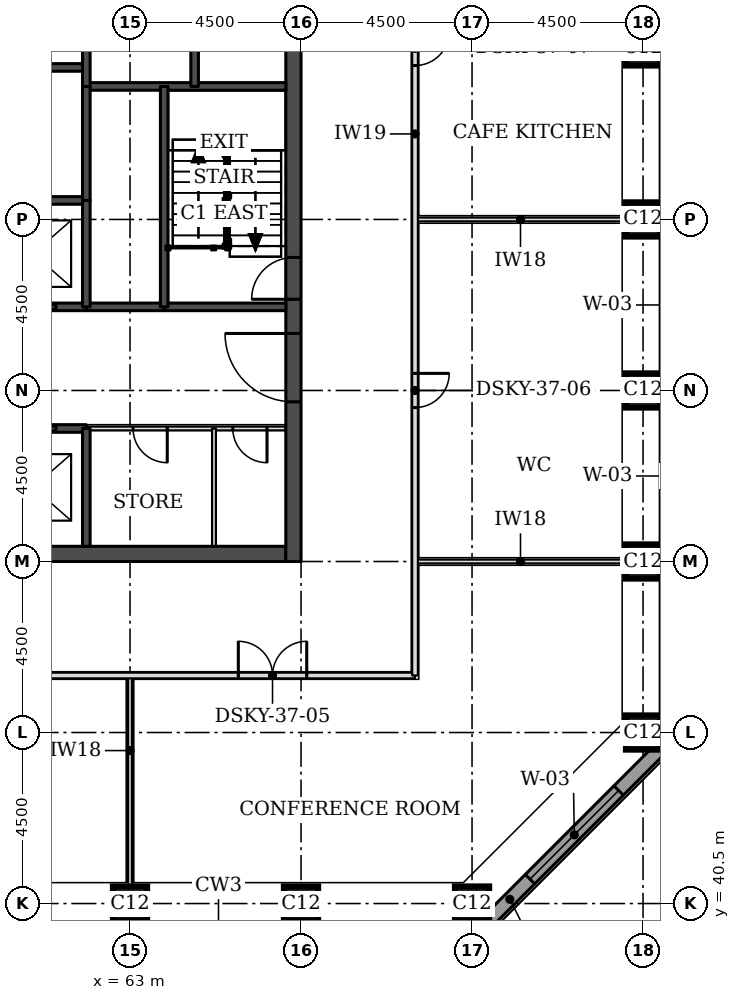
"""IFC4 building model, lengths in metres.
Left out: names, types, materials, properties, quantities, classifications, styles, units other than length and angle.
Written with IfcOpenShell. Run it as: python <this file> out.ifc"""

import sys

from ifc_helpers import new_model, si_unit, direction, frame, frame_2d, origin, origin_2d, place, context, subcontext, project, spatial, rectangle, extrude, element, fill, save


model = new_model("IFC4")
c1 = context("Model", 3, precision=1e-05, world=origin(), true_north=direction((0.0, 1.0)))
c2 = subcontext(c1, "Body", "Model", "MODEL_VIEW")
j1 = project(units=[si_unit("LENGTHUNIT", "METRE"), si_unit("PLANEANGLEUNIT", "RADIAN")], contexts=[c1])
p1 = place(None, origin())
s1 = spatial("IfcSite", under=j1, at=p1, CompositionType="ELEMENT")
p2 = place(p1, origin())
s2 = spatial("IfcBuilding", under=s1, at=p2, CompositionType="ELEMENT")
p3 = place(p2, frame((0.0, 0.0, 143.1)))
s3 = spatial("IfcBuildingStorey", under=s2, at=p3, CompositionType="ELEMENT", Elevation=143.1)
for number, where, z_axis, x_axis in (
    (1, (63.0, 40.5, 0.0), (0.0, 0.0, 1.0), (1.0, 0.0, 0.0)),
    (2, (67.5, 40.5, 0.0), (0.0, 0.0, 1.0), (1.0, 0.0, 0.0)),
    (3, (72.0, 40.5, 0.0), (0.0, 0.0, 1.0), (1.0, 0.0, 0.0)),
    (4, (76.5, 45.0, 0.0), (0.0, 0.0, 1.0), (1.0, 0.0, 0.0)),
    (5, (76.5, 49.5, 0.0), (0.0, 0.0, 1.0), (1.0, 0.0, 0.0)),
    (6, (76.5, 54.0, 0.0), (0.0, 0.0, 1.0), (1.0, 0.0, 0.0)),
    (7, (76.5, 58.5, 0.0), (0.0, 0.0, 1.0), (1.0, 0.0, 0.0)),
    (8, (76.5, 63.0, 0.0), (0.0, 0.0, 1.0), (1.0, 0.0, 0.0)),
):
    element("IfcColumn", number, at=place(p3, frame(where, z_axis=z_axis, x_axis=x_axis)), inside=s3, PredefinedType="COLUMN", context=c2, shape_type="SweptSolid", body=[
        extrude(rectangle(XDim=0.9, YDim=0.9, at=origin_2d()), origin(), (0.0, 0.0, 1.0), 4.6),
    ])
p4 = place(p3, frame((45.4, 49.7, 0.0), z_axis=(0.0, 0.0, 1.0), x_axis=(1.0, 0.0, 0.0)))
e9 = element("IfcWall", 9, at=p4, inside=s3, PredefinedType="SHEAR", context=c2, shape_type="SweptSolid", body=[
    extrude(rectangle(XDim=21.7, YDim=0.4, at=frame_2d((10.85, 0.0))), origin(), (0.0, 0.0, 1.0), 4.6),
])
p5 = place(p3, frame((67.3, 49.5, 0.0), z_axis=(0.0, 0.0, 1.0), x_axis=(0.0, 1.0, 0.0)))
e10 = element("IfcWall", 10, at=p5, inside=s3, PredefinedType="SHEAR", context=c2, shape_type="SweptSolid", body=[
    extrude(rectangle(XDim=22.5, YDim=0.4, at=frame_2d((11.25, 0.0))), origin(), (0.0, 0.0, 1.0), 4.6),
])
p6 = place(p5, frame((4.2, 0.0, 0.0)))
e11 = element("IfcOpeningElement", 11, at=p6, cuts=e10, PredefinedType="OPENING", context=c2, shape_type="SweptSolid", body=[
    extrude(rectangle(XDim=1.8, YDim=2.1, at=frame_2d((0.9, 1.05))), frame((0.0, 0.21, 0.0), z_axis=(0.0, -1.0, 0.0), x_axis=(1.0, 0.0, 0.0)), (0.0, 0.0, 1.0), 0.42),
])
p7 = place(p5, frame((6.9, 0.0, 0.0)))
e12 = element("IfcOpeningElement", 12, at=p7, cuts=e10, PredefinedType="OPENING", context=c2, shape_type="SweptSolid", body=[
    extrude(rectangle(XDim=1.1, YDim=2.1, at=frame_2d((0.55, 1.05))), frame((0.0, 0.21, 0.0), z_axis=(0.0, -1.0, 0.0), x_axis=(1.0, 0.0, 0.0)), (0.0, 0.0, 1.0), 0.42),
])
p8 = place(p5, frame((13.6, 0.0, 0.0)))
e13 = element("IfcOpeningElement", 13, at=p8, cuts=e10, PredefinedType="OPENING", context=c2, shape_type="SweptSolid", body=[
    extrude(rectangle(XDim=1.1, YDim=2.1, at=frame_2d((0.55, 1.05))), frame((0.0, 0.21, 0.0), z_axis=(0.0, -1.0, 0.0), x_axis=(1.0, 0.0, 0.0)), (0.0, 0.0, 1.0), 0.42),
])
p9 = place(p5, frame((16.5, 0.0, 0.0)))
e14 = element("IfcOpeningElement", 14, at=p9, cuts=e10, PredefinedType="OPENING", context=c2, shape_type="SweptSolid", body=[
    extrude(rectangle(XDim=1.8, YDim=2.1, at=frame_2d((0.9, 1.05))), frame((0.0, 0.21, 0.0), z_axis=(0.0, -1.0, 0.0), x_axis=(1.0, 0.0, 0.0)), (0.0, 0.0, 1.0), 0.42),
])
p10 = place(p3, frame((72.208, 39.824, 0.0), z_axis=(0.0, 0.0, 1.0), x_axis=(0.707106781187, 0.707106781187, 0.0)))
e15 = element("IfcWall", 15, at=p10, inside=s3, PredefinedType="STANDARD", context=c2, shape_type="SweptSolid", body=[
    extrude(rectangle(XDim=7.027, YDim=0.35, at=frame_2d((3.513, 0.0))), origin(), (0.0, 0.0, 1.0), 4.425),
])
p11 = place(p10, frame((1.863, 0.0, 0.9)))
e16 = element("IfcOpeningElement", 16, at=p11, cuts=e15, PredefinedType="OPENING", context=c2, shape_type="SweptSolid", body=[
    extrude(rectangle(XDim=3.3, YDim=2.7, at=frame_2d((1.65, 1.35))), frame((0.0, 0.185, 0.0), z_axis=(0.0, -1.0, 0.0), x_axis=(1.0, 0.0, 0.0)), (0.0, 0.0, 1.0), 0.37),
])
for number, where, z_axis, x_axis in (
    (17, (63.0, 40.95, 0.0), (0.0, 0.0, 1.0), (0.0, 1.0, 0.0)),
    (18, (70.5, 49.5, 0.0), (0.0, 0.0, 1.0), (1.0, 0.0, 0.0)),
    (19, (70.5, 58.5, 0.0), (0.0, 0.0, 1.0), (1.0, 0.0, 0.0)),
):
    element("IfcWall", number, at=place(p3, frame(where, z_axis=z_axis, x_axis=x_axis)), inside=s3, PredefinedType="PARTITIONING", context=c2, shape_type="SweptSolid", body=[
        extrude(rectangle(XDim=5.55, YDim=0.1, at=frame_2d((2.775, 0.0))), origin(), (0.0, 0.0, 1.0), 4.45),
    ])
p12 = place(p3, frame((42.0, 46.5, 0.0), z_axis=(0.0, 0.0, 1.0), x_axis=(1.0, 0.0, 0.0)))
e20 = element("IfcWall", 20, at=p12, inside=s3, PredefinedType="PARTITIONING", context=c2, shape_type="SweptSolid", body=[
    extrude(rectangle(XDim=28.5, YDim=0.15, at=frame_2d((14.25, 0.0))), origin(), (0.0, 0.0, 1.0), 4.45),
])
p13 = place(p12, frame((7.05, 0.0, 0.0)))
e21 = element("IfcOpeningElement", 21, at=p13, cuts=e20, PredefinedType="OPENING", context=c2, shape_type="SweptSolid", body=[
    extrude(rectangle(XDim=0.9, YDim=2.1, at=frame_2d((0.45, 1.05))), frame((0.0, 0.085, 0.0), z_axis=(0.0, -1.0, 0.0), x_axis=(1.0, 0.0, 0.0)), (0.0, 0.0, 1.0), 0.17),
])
p14 = place(p12, frame((16.05, 0.0, 0.0)))
e22 = element("IfcOpeningElement", 22, at=p14, cuts=e20, PredefinedType="OPENING", context=c2, shape_type="SweptSolid", body=[
    extrude(rectangle(XDim=0.9, YDim=2.1, at=frame_2d((0.45, 1.05))), frame((0.0, 0.085, 0.0), z_axis=(0.0, -1.0, 0.0), x_axis=(1.0, 0.0, 0.0)), (0.0, 0.0, 1.0), 0.17),
])
p15 = place(p12, frame((23.85, 0.0, 0.0)))
e23 = element("IfcOpeningElement", 23, at=p15, cuts=e20, PredefinedType="OPENING", context=c2, shape_type="SweptSolid", body=[
    extrude(rectangle(XDim=1.8, YDim=2.1, at=frame_2d((0.9, 1.05))), frame((0.0, 0.085, 0.0), z_axis=(0.0, -1.0, 0.0), x_axis=(1.0, 0.0, 0.0)), (0.0, 0.0, 1.0), 0.17),
])
p16 = place(p3, frame((70.5, 46.5, 0.0), z_axis=(0.0, 0.0, 1.0), x_axis=(0.0, 1.0, 0.0)))
e24 = element("IfcWall", 24, at=p16, inside=s3, PredefinedType="PARTITIONING", context=c2, shape_type="SweptSolid", body=[
    extrude(rectangle(XDim=28.5, YDim=0.15, at=frame_2d((14.25, 0.0))), origin(), (0.0, 0.0, 1.0), 4.45),
])
p17 = place(p16, frame((7.05, 0.0, 0.0)))
e25 = element("IfcOpeningElement", 25, at=p17, cuts=e24, PredefinedType="OPENING", context=c2, shape_type="SweptSolid", body=[
    extrude(rectangle(XDim=0.9, YDim=2.1, at=frame_2d((0.45, 1.05))), frame((0.0, 0.085, 0.0), z_axis=(0.0, -1.0, 0.0), x_axis=(1.0, 0.0, 0.0)), (0.0, 0.0, 1.0), 0.17),
])
p18 = place(p16, frame((16.05, 0.0, 0.0)))
e26 = element("IfcOpeningElement", 26, at=p18, cuts=e24, PredefinedType="OPENING", context=c2, shape_type="SweptSolid", body=[
    extrude(rectangle(XDim=0.9, YDim=2.1, at=frame_2d((0.45, 1.05))), frame((0.0, 0.085, 0.0), z_axis=(0.0, -1.0, 0.0), x_axis=(1.0, 0.0, 0.0)), (0.0, 0.0, 1.0), 0.17),
])
p19 = place(p16, frame((23.85, 0.0, 0.0)))
e27 = element("IfcOpeningElement", 27, at=p19, cuts=e24, PredefinedType="OPENING", context=c2, shape_type="SweptSolid", body=[
    extrude(rectangle(XDim=1.8, YDim=2.4, at=frame_2d((0.9, 1.2))), frame((0.0, 0.085, 0.0), z_axis=(0.0, -1.0, 0.0), x_axis=(1.0, 0.0, 0.0)), (0.0, 0.0, 1.0), 0.17),
])
p20 = place(p3, frame((61.85, 53.0, 0.0), z_axis=(0.0, 0.0, 1.0), x_axis=(1.0, 0.0, 0.0)))
e28 = element("IfcWall", 28, at=p20, inside=s3, PredefinedType="PARTITIONING", context=c2, shape_type="SweptSolid", body=[
    extrude(rectangle(XDim=5.25, YDim=0.1, at=frame_2d((2.625, 0.0))), origin(), (0.0, 0.0, 1.0), 4.45),
])
p21 = place(p20, frame((3.855, 0.0, 0.0)))
e29 = element("IfcOpeningElement", 29, at=p21, cuts=e28, PredefinedType="OPENING", context=c2, shape_type="SweptSolid", body=[
    extrude(rectangle(XDim=0.9, YDim=2.1, at=frame_2d((0.45, 1.05))), frame((0.0, 0.06, 0.0), z_axis=(0.0, -1.0, 0.0), x_axis=(1.0, 0.0, 0.0)), (0.0, 0.0, 1.0), 0.12),
])
p22 = place(p20, frame((1.23, 0.0, 0.0)))
e30 = element("IfcOpeningElement", 30, at=p22, cuts=e28, PredefinedType="OPENING", context=c2, shape_type="SweptSolid", body=[
    extrude(rectangle(XDim=0.9, YDim=2.1, at=frame_2d((0.45, 1.05))), frame((0.0, 0.06, 0.0), z_axis=(0.0, -1.0, 0.0), x_axis=(1.0, 0.0, 0.0)), (0.0, 0.0, 1.0), 0.12),
])
p23 = place(p3, frame((50.65, 53.0, 0.0), z_axis=(0.0, 0.0, 1.0), x_axis=(1.0, 0.0, 0.0)))
e31 = element("IfcWall", 31, at=p23, inside=s3, PredefinedType="SOLIDWALL", context=c2, shape_type="SweptSolid", body=[
    extrude(rectangle(XDim=11.2, YDim=0.2, at=frame_2d((5.6, 0.0))), origin(), (0.0, 0.0, 1.0), 4.45),
])
p24 = place(p23, frame((0.8, 0.0, 0.0)))
e32 = element("IfcOpeningElement", 32, at=p24, cuts=e31, PredefinedType="OPENING", context=c2, shape_type="SweptSolid", body=[
    extrude(rectangle(XDim=1.2, YDim=2.1, at=frame_2d((0.6, 1.05))), frame((0.0, 0.11, 0.0), z_axis=(0.0, -1.0, 0.0), x_axis=(1.0, 0.0, 0.0)), (0.0, 0.0, 1.0), 0.22),
])
p25 = place(p23, frame((3.6, 0.0, 0.0)))
e33 = element("IfcOpeningElement", 33, at=p25, cuts=e31, PredefinedType="OPENING", context=c2, shape_type="SweptSolid", body=[
    extrude(rectangle(XDim=1.2, YDim=2.1, at=frame_2d((0.6, 1.05))), frame((0.0, 0.11, 0.0), z_axis=(0.0, -1.0, 0.0), x_axis=(1.0, 0.0, 0.0)), (0.0, 0.0, 1.0), 0.22),
])
p26 = place(p23, frame((6.4, 0.0, 0.0)))
e34 = element("IfcOpeningElement", 34, at=p26, cuts=e31, PredefinedType="OPENING", context=c2, shape_type="SweptSolid", body=[
    extrude(rectangle(XDim=1.2, YDim=2.1, at=frame_2d((0.6, 1.05))), frame((0.0, 0.11, 0.0), z_axis=(0.0, -1.0, 0.0), x_axis=(1.0, 0.0, 0.0)), (0.0, 0.0, 1.0), 0.22),
])
p27 = place(p23, frame((9.2, 0.0, 0.0)))
e35 = element("IfcOpeningElement", 35, at=p27, cuts=e31, PredefinedType="OPENING", context=c2, shape_type="SweptSolid", body=[
    extrude(rectangle(XDim=1.2, YDim=2.1, at=frame_2d((0.6, 1.05))), frame((0.0, 0.11, 0.0), z_axis=(0.0, -1.0, 0.0), x_axis=(1.0, 0.0, 0.0)), (0.0, 0.0, 1.0), 0.22),
])
p28 = place(p3, frame((61.85, 56.2, 0.0), z_axis=(0.0, 0.0, 1.0), x_axis=(1.0, 0.0, 0.0)))
e36 = element("IfcWall", 36, at=p28, inside=s3, PredefinedType="SOLIDWALL", context=c2, shape_type="SweptSolid", body=[
    extrude(rectangle(XDim=2.05, YDim=0.2, at=frame_2d((1.025, 0.0))), origin(), (0.0, 0.0, 1.0), 4.45),
])
p29 = place(p3, frame((50.65, 56.2, 0.0), z_axis=(0.0, 0.0, 1.0), x_axis=(1.0, 0.0, 0.0)))
e37 = element("IfcWall", 37, at=p29, inside=s3, PredefinedType="SOLIDWALL", context=c2, shape_type="SweptSolid", body=[
    extrude(rectangle(XDim=11.2, YDim=0.2, at=frame_2d((5.6, 0.0))), origin(), (0.0, 0.0, 1.0), 4.45),
])
p30 = place(p29, frame((0.8, 0.0, 0.0)))
e38 = element("IfcOpeningElement", 38, at=p30, cuts=e37, PredefinedType="OPENING", context=c2, shape_type="SweptSolid", body=[
    extrude(rectangle(XDim=1.2, YDim=2.1, at=frame_2d((0.6, 1.05))), frame((0.0, 0.11, 0.0), z_axis=(0.0, -1.0, 0.0), x_axis=(1.0, 0.0, 0.0)), (0.0, 0.0, 1.0), 0.22),
])
p31 = place(p29, frame((3.6, 0.0, 0.0)))
e39 = element("IfcOpeningElement", 39, at=p31, cuts=e37, PredefinedType="OPENING", context=c2, shape_type="SweptSolid", body=[
    extrude(rectangle(XDim=1.2, YDim=2.1, at=frame_2d((0.6, 1.05))), frame((0.0, 0.11, 0.0), z_axis=(0.0, -1.0, 0.0), x_axis=(1.0, 0.0, 0.0)), (0.0, 0.0, 1.0), 0.22),
])
p32 = place(p29, frame((6.4, 0.0, 0.0)))
e40 = element("IfcOpeningElement", 40, at=p32, cuts=e37, PredefinedType="OPENING", context=c2, shape_type="SweptSolid", body=[
    extrude(rectangle(XDim=1.2, YDim=2.1, at=frame_2d((0.6, 1.05))), frame((0.0, 0.11, 0.0), z_axis=(0.0, -1.0, 0.0), x_axis=(1.0, 0.0, 0.0)), (0.0, 0.0, 1.0), 0.22),
])
p33 = place(p29, frame((9.2, 0.0, 0.0)))
e41 = element("IfcOpeningElement", 41, at=p33, cuts=e37, PredefinedType="OPENING", context=c2, shape_type="SweptSolid", body=[
    extrude(rectangle(XDim=1.2, YDim=2.1, at=frame_2d((0.6, 1.05))), frame((0.0, 0.11, 0.0), z_axis=(0.0, -1.0, 0.0), x_axis=(1.0, 0.0, 0.0)), (0.0, 0.0, 1.0), 0.22),
])
p34 = place(p3, frame((63.9, 56.2, 0.0), z_axis=(0.0, 0.0, 1.0), x_axis=(1.0, 0.0, 0.0)))
e42 = element("IfcWall", 42, at=p34, inside=s3, PredefinedType="SOLIDWALL", context=c2, shape_type="SweptSolid", body=[
    extrude(rectangle(XDim=3.2, YDim=0.2, at=frame_2d((1.6, 0.0))), origin(), (0.0, 0.0, 1.0), 4.45),
])
p35 = place(p3, frame((50.65, 59.0, 0.0), z_axis=(0.0, 0.0, 1.0), x_axis=(1.0, 0.0, 0.0)))
e43 = element("IfcWall", 43, at=p35, inside=s3, PredefinedType="SOLIDWALL", context=c2, shape_type="SweptSolid", body=[
    extrude(rectangle(XDim=11.2, YDim=0.2, at=frame_2d((5.6, 0.0))), origin(), (0.0, 0.0, 1.0), 4.6),
])
p36 = place(p3, frame((61.85, 62.0, 0.0), z_axis=(0.0, 0.0, 1.0), x_axis=(1.0, 0.0, 0.0)))
e44 = element("IfcWall", 44, at=p36, inside=s3, PredefinedType="SOLIDWALL", context=c2, shape_type="SweptSolid", body=[
    extrude(rectangle(XDim=5.25, YDim=0.2, at=frame_2d((2.625, 0.0))), origin(), (0.0, 0.0, 1.0), 4.45),
])
p37 = place(p3, frame((50.65, 62.5, 0.0), z_axis=(0.0, 0.0, 1.0), x_axis=(1.0, 0.0, 0.0)))
e45 = element("IfcWall", 45, at=p37, inside=s3, PredefinedType="SOLIDWALL", context=c2, shape_type="SweptSolid", body=[
    extrude(rectangle(XDim=11.2, YDim=0.2, at=frame_2d((5.6, 0.0))), origin(), (0.0, 0.0, 1.0), 4.6),
])
p38 = place(p3, frame((61.85, 59.0, 0.0), z_axis=(0.0, 0.0, 1.0), x_axis=(0.0, 1.0, 0.0)))
e46 = element("IfcWall", 46, at=p38, inside=s3, PredefinedType="SOLIDWALL", context=c2, shape_type="SweptSolid", body=[
    extrude(rectangle(XDim=3.0, YDim=0.2, at=frame_2d((1.5, 0.0))), origin(), (0.0, 0.0, 1.0), 4.6),
])
p39 = place(p3, frame((61.85, 49.9, 0.0), z_axis=(0.0, 0.0, 1.0), x_axis=(0.0, 1.0, 0.0)))
e47 = element("IfcWall", 47, at=p39, inside=s3, PredefinedType="SOLIDWALL", context=c2, shape_type="SweptSolid", body=[
    extrude(rectangle(XDim=3.1, YDim=0.2, at=frame_2d((1.55, 0.0))), origin(), (0.0, 0.0, 1.0), 4.45),
])
p40 = place(p3, frame((61.85, 56.2, 0.0), z_axis=(0.0, 0.0, 1.0), x_axis=(0.0, 1.0, 0.0)))
e48 = element("IfcWall", 48, at=p40, inside=s3, PredefinedType="SOLIDWALL", context=c2, shape_type="SweptSolid", body=[
    extrude(rectangle(XDim=2.8, YDim=0.2, at=frame_2d((1.4, 0.0))), origin(), (0.0, 0.0, 1.0), 4.45),
])
p41 = place(p3, frame((61.85, 62.0, 0.0), z_axis=(0.0, 0.0, 1.0), x_axis=(0.0, 1.0, 0.0)))
e49 = element("IfcWall", 49, at=p41, inside=s3, PredefinedType="SOLIDWALL", context=c2, shape_type="SweptSolid", body=[
    extrude(rectangle(XDim=3.3, YDim=0.2, at=frame_2d((1.65, 0.0))), origin(), (0.0, 0.0, 1.0), 4.45),
])
p42 = place(p3, frame((63.9, 56.2, 0.0), z_axis=(0.0, 0.0, 1.0), x_axis=(0.0, 1.0, 0.0)))
e50 = element("IfcWall", 50, at=p42, inside=s3, PredefinedType="SOLIDWALL", context=c2, shape_type="SweptSolid", body=[
    extrude(rectangle(XDim=5.8, YDim=0.2, at=frame_2d((2.9, 0.0))), origin(), (0.0, 0.0, 1.0), 4.45),
])
p43 = place(p3, frame((64.7, 62.0, 0.0), z_axis=(0.0, 0.0, 1.0), x_axis=(0.0, 1.0, 0.0)))
e51 = element("IfcWall", 51, at=p43, inside=s3, PredefinedType="SOLIDWALL", context=c2, shape_type="SweptSolid", body=[
    extrude(rectangle(XDim=3.3, YDim=0.2, at=frame_2d((1.65, 0.0))), origin(), (0.0, 0.0, 1.0), 4.45),
])
p44 = place(p43, frame((1.1, 0.0, 0.0)))
e52 = element("IfcOpeningElement", 52, at=p44, cuts=e51, PredefinedType="OPENING", context=c2, shape_type="SweptSolid", body=[
    extrude(rectangle(XDim=1.1, YDim=2.1, at=frame_2d((0.55, 1.05))), frame((0.0, 0.11, 0.0), z_axis=(0.0, -1.0, 0.0), x_axis=(1.0, 0.0, 0.0)), (0.0, 0.0, 1.0), 0.22),
])
p45 = place(p3, frame((65.21, 49.9, 0.0), z_axis=(0.0, 0.0, 1.0), x_axis=(0.0, 1.0, 0.0)))
e53 = element("IfcWall", 53, at=p45, inside=s3, PredefinedType="PARTITIONING", context=c2, shape_type="SweptSolid", body=[
    extrude(rectangle(XDim=3.1, YDim=0.1, at=frame_2d((1.55, 0.0))), origin(), (0.0, 0.0, 1.0), 4.45),
])
p46 = place(p11, origin())
e54 = element("IfcWindow", 54, at=p46, inside=s3, PartitioningType="SINGLE_PANEL", PredefinedType="WINDOW", context=c2, shape_type="SweptSolid", body=[
    extrude(rectangle(XDim=3.3, YDim=2.7, at=frame_2d((1.65, 1.35))), frame((0.0, 0.085, 0.0), z_axis=(0.0, -1.0, 0.0), x_axis=(1.0, 0.0, 0.0)), (0.0, 0.0, 1.0), 0.06),
])
fill(e16, e54)
p47 = place(p15, origin())
e55 = element("IfcDoor", 55, at=p47, inside=s3, OperationType="DOUBLE_DOOR_SINGLE_SWING", PredefinedType="DOOR", context=c2, shape_type="SweptSolid", body=[
    extrude(rectangle(XDim=1.8, YDim=2.1, at=frame_2d((0.9, 1.05))), frame((0.0, 0.025, 0.0), z_axis=(0.0, -1.0, 0.0), x_axis=(1.0, 0.0, 0.0)), (0.0, 0.0, 1.0), 0.05),
])
fill(e23, e55)
p48 = place(p17, frame((0.9, 0.0, 0.0), z_axis=(0.0, 0.0, 1.0), x_axis=(-1.0, 0.0, 0.0)))
e56 = element("IfcDoor", 56, at=p48, inside=s3, OperationType="SINGLE_SWING_LEFT", PredefinedType="DOOR", context=c2, shape_type="SweptSolid", body=[
    extrude(rectangle(XDim=0.9, YDim=2.1, at=frame_2d((0.45, 1.05))), frame((0.0, 0.025, 0.0), z_axis=(0.0, -1.0, 0.0), x_axis=(1.0, 0.0, 0.0)), (0.0, 0.0, 1.0), 0.05),
])
fill(e25, e56)
p49 = place(p18, frame((0.9, 0.0, 0.0), z_axis=(0.0, 0.0, 1.0), x_axis=(-1.0, 0.0, 0.0)))
e57 = element("IfcDoor", 57, at=p49, inside=s3, OperationType="SINGLE_SWING_LEFT", PredefinedType="DOOR", context=c2, shape_type="SweptSolid", body=[
    extrude(rectangle(XDim=0.9, YDim=2.1, at=frame_2d((0.45, 1.05))), frame((0.0, 0.025, 0.0), z_axis=(0.0, -1.0, 0.0), x_axis=(1.0, 0.0, 0.0)), (0.0, 0.0, 1.0), 0.05),
])
fill(e26, e57)
p50 = place(p27, origin())
e58 = element("IfcDoor", 58, at=p50, inside=s3, OperationType="DOUBLE_DOOR_SLIDING", PredefinedType="DOOR", context=c2, shape_type="SweptSolid", body=[
    extrude(rectangle(XDim=1.2, YDim=2.1, at=frame_2d((0.6, 1.05))), frame((0.0, 0.025, 0.0), z_axis=(0.0, -1.0, 0.0), x_axis=(1.0, 0.0, 0.0)), (0.0, 0.0, 1.0), 0.05),
])
fill(e35, e58)
p51 = place(p33, origin())
e59 = element("IfcDoor", 59, at=p51, inside=s3, OperationType="DOUBLE_DOOR_SLIDING", PredefinedType="DOOR", context=c2, shape_type="SweptSolid", body=[
    extrude(rectangle(XDim=1.2, YDim=2.1, at=frame_2d((0.6, 1.05))), frame((0.0, 0.025, 0.0), z_axis=(0.0, -1.0, 0.0), x_axis=(1.0, 0.0, 0.0)), (0.0, 0.0, 1.0), 0.05),
])
fill(e41, e59)
p52 = place(p6, origin())
e60 = element("IfcDoor", 60, at=p52, inside=s3, OperationType="SINGLE_SWING_RIGHT", PredefinedType="DOOR", context=c2, shape_type="SweptSolid", body=[
    extrude(rectangle(XDim=1.8, YDim=2.1, at=frame_2d((0.9, 1.05))), frame((0.0, 0.025, 0.0), z_axis=(0.0, -1.0, 0.0), x_axis=(1.0, 0.0, 0.0)), (0.0, 0.0, 1.0), 0.05),
])
fill(e11, e60)
p53 = place(p7, origin())
e61 = element("IfcDoor", 61, at=p53, inside=s3, OperationType="SINGLE_SWING_LEFT", PredefinedType="DOOR", context=c2, shape_type="SweptSolid", body=[
    extrude(rectangle(XDim=1.1, YDim=2.1, at=frame_2d((0.55, 1.05))), frame((0.0, 0.025, 0.0), z_axis=(0.0, -1.0, 0.0), x_axis=(1.0, 0.0, 0.0)), (0.0, 0.0, 1.0), 0.05),
])
fill(e12, e61)
p54 = place(p21, frame((0.9, 0.0, 0.0), z_axis=(0.0, 0.0, 1.0), x_axis=(-1.0, 0.0, 0.0)))
e62 = element("IfcDoor", 62, at=p54, inside=s3, OperationType="SINGLE_SWING_LEFT", PredefinedType="DOOR", context=c2, shape_type="SweptSolid", body=[
    extrude(rectangle(XDim=0.9, YDim=2.1, at=frame_2d((0.45, 1.05))), frame((0.0, 0.025, 0.0), z_axis=(0.0, -1.0, 0.0), x_axis=(1.0, 0.0, 0.0)), (0.0, 0.0, 1.0), 0.05),
])
fill(e29, e62)
p55 = place(p22, frame((0.9, 0.0, 0.0), z_axis=(0.0, 0.0, 1.0), x_axis=(-1.0, 0.0, 0.0)))
e63 = element("IfcDoor", 63, at=p55, inside=s3, OperationType="SINGLE_SWING_LEFT", PredefinedType="DOOR", context=c2, shape_type="SweptSolid", body=[
    extrude(rectangle(XDim=0.9, YDim=2.1, at=frame_2d((0.45, 1.05))), frame((0.0, 0.025, 0.0), z_axis=(0.0, -1.0, 0.0), x_axis=(1.0, 0.0, 0.0)), (0.0, 0.0, 1.0), 0.05),
])
fill(e30, e63)
save(model, sys.argv[1])
